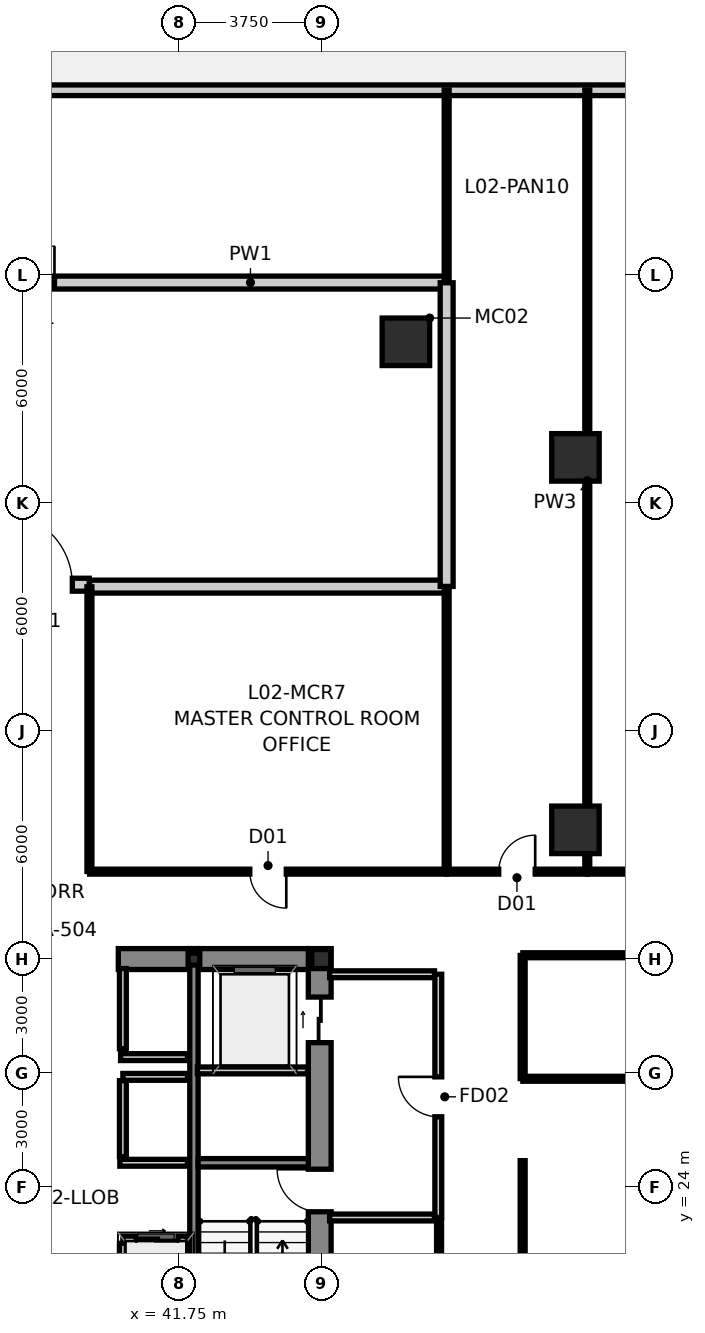
"""IFC4 building model, lengths in metres.
Left out: names, types, materials, properties, quantities, classifications, styles, units other than length and angle.
Written with IfcOpenShell. Run it as: python <this file> out.ifc"""

import sys

from ifc_helpers import new_model, si_unit, direction, frame, frame_2d, origin, origin_2d, place, context, subcontext, project, spatial, rectangle, hollow_rectangle, i_section, extrude, source, transform, mapped, element, fill, save


model = new_model("IFC4")
c1 = context("Model", 3, precision=1e-05, world=origin(), true_north=direction((0.0, 1.0)))
c2 = subcontext(c1, "Body", "Model", "MODEL_VIEW")
j1 = project(units=[si_unit("LENGTHUNIT", "METRE"), si_unit("PLANEANGLEUNIT", "RADIAN")], contexts=[c1])
p1 = place(None, origin())
s1 = spatial("IfcSite", under=j1, at=p1, CompositionType="ELEMENT")
p2 = place(p1, origin())
s2 = spatial("IfcBuilding", under=s1, at=p2, CompositionType="ELEMENT")
p3 = place(p2, frame((0.0, 0.0, 10.2)))
s3 = spatial("IfcBuildingStorey", under=s2, at=p3, CompositionType="ELEMENT", Elevation=10.2)
m1 = source(origin(), c2, "Body", "SweptSolid", [
    extrude(i_section(OverallWidth=0.5, OverallDepth=0.5, WebThickness=0.028, FlangeThickness=0.04, at=origin_2d()), origin(), (0.0, 0.0, 1.0), 4.5),
])
p4 = place(p3, frame((45.5, 30.0, 0.0), z_axis=(0.0, 0.0, 1.0), x_axis=(1.0, 0.0, 0.0)))
e1 = element("IfcColumn", 1, at=p4, inside=s3, PredefinedType="COLUMN", context=c2, shape_type="MappedRepresentation", body=[
    mapped(m1, transform((0.0, 0.0, 0.0), scale=1.0)),
])
m2 = source(origin(), c2, "Body", "SweptSolid", [
    extrude(i_section(OverallWidth=0.307, OverallDepth=0.315, WebThickness=0.012, FlangeThickness=0.019, at=origin_2d()), origin(), (0.0, 0.0, 1.0), 4.5),
])
p5 = place(p3, frame((42.15, 30.0, 0.0), z_axis=(0.0, 0.0, 1.0), x_axis=(1.0, 0.0, 0.0)))
e2 = element("IfcColumn", 2, at=p5, inside=s3, PredefinedType="COLUMN", context=c2, shape_type="MappedRepresentation", body=[
    mapped(m2, transform((0.0, 0.0, 0.0), scale=1.0)),
])
p6 = place(p3, frame((45.46, 16.85, 0.0), z_axis=(0.0, 0.0, 1.0), x_axis=(0.0, 1.0, 0.0)))
e3 = element("IfcWall", 3, at=p6, inside=s3, PredefinedType="SHEAR", context=c2, shape_type="SweptSolid", body=[
    extrude(rectangle(XDim=13.425, YDim=0.6, at=frame_2d((6.712, 0.0))), origin(), (0.0, 0.0, 1.0), 4.5),
])
p7 = place(p6, frame((6.5, 0.0, 0.0)))
e4 = element("IfcOpeningElement", 4, at=p7, cuts=e3, PredefinedType="OPENING", context=c2, shape_type="SweptSolid", body=[
    extrude(rectangle(XDim=1.12, YDim=2.15, at=frame_2d((0.56, 1.075))), frame((0.0, 0.312, 0.0), z_axis=(0.0, -1.0, 0.0), x_axis=(1.0, 0.0, 0.0)), (0.0, 0.0, 1.0), 0.624),
])
p8 = place(p6, frame((10.95, 0.0, 0.0)))
e5 = element("IfcOpeningElement", 5, at=p8, cuts=e3, PredefinedType="OPENING", context=c2, shape_type="SweptSolid", body=[
    extrude(rectangle(XDim=1.2, YDim=2.2, at=frame_2d((0.6, 1.1))), frame((0.0, 0.312, 0.0), z_axis=(0.0, -1.0, 0.0), x_axis=(1.0, 0.0, 0.0)), (0.0, 0.0, 1.0), 0.624),
])
p9 = place(p3, frame((40.16, 30.0, 0.0), z_axis=(0.0, 0.0, 1.0), x_axis=(1.0, 0.0, 0.0)))
e6 = element("IfcWall", 6, at=p9, inside=s3, PredefinedType="SHEAR", context=c2, shape_type="SweptSolid", body=[
    extrude(rectangle(XDim=1.88, YDim=0.55, at=frame_2d((0.94, 0.0))), origin(), (0.0, 0.0, 1.0), 4.5),
])
p10 = place(p3, frame((42.26, 30.0, 0.0), z_axis=(0.0, 0.0, 1.0), x_axis=(1.0, 0.0, 0.0)))
e7 = element("IfcWall", 7, at=p10, inside=s3, PredefinedType="SHEAR", context=c2, shape_type="SweptSolid", body=[
    extrude(rectangle(XDim=2.9, YDim=0.55, at=frame_2d((1.45, 0.0))), origin(), (0.0, 0.0, 1.0), 4.5),
])
p11 = place(p3, frame((42.15, 16.85, 0.0), z_axis=(0.0, 0.0, 1.0), x_axis=(0.0, 1.0, 0.0)))
e8 = element("IfcWall", 8, at=p11, inside=s3, PredefinedType="SHEAR", context=c2, shape_type="SweptSolid", body=[
    extrude(rectangle(XDim=13.425, YDim=0.22, at=frame_2d((6.712, 0.0))), origin(), (0.0, 0.0, 1.0), 4.5),
])
p12 = place(p3, frame((42.26, 24.64, 0.0), z_axis=(0.0, 0.0, 1.0), x_axis=(1.0, 0.0, 0.0)))
e9 = element("IfcWall", 9, at=p12, inside=s3, PredefinedType="SHEAR", context=c2, shape_type="SweptSolid", body=[
    extrude(rectangle(XDim=2.9, YDim=0.22, at=frame_2d((1.45, 0.0))), origin(), (0.0, 0.0, 1.0), 4.5),
])
m3 = source(origin(), c2, "Body", "SweptSolid", [
    extrude(hollow_rectangle(XDim=1.25, YDim=1.25, WallThickness=0.07, at=origin_2d()), origin(), (0.0, 0.0, 1.0), 4.501),
])
p13 = place(p3, frame((47.727, 46.241, 0.0), z_axis=(-0.023918900089, 0.001735611798, 0.999712395577), x_axis=(-0.072372078217, -0.997377702926, 0.0)))
e10 = element("IfcColumn", 10, at=p13, inside=s3, PredefinedType="COLUMN", context=c2, shape_type="MappedRepresentation", body=[
    mapped(m3, transform((0.0, 0.0, 0.0), scale=1.0)),
])
m4 = source(origin(), c2, "Body", "SweptSolid", [
    extrude(hollow_rectangle(XDim=1.25, YDim=1.25, WallThickness=0.07, at=origin_2d()), origin(), (0.0, 0.0, 1.0), 4.5),
])
for number, where, z_axis, x_axis in (
    (11, (52.189, 33.4, 0.0), (0.0, 0.0, 1.0), (1.0, 0.0, 0.0)),
    (12, (52.189, 43.2, 0.0), (0.0, 0.0, 1.0), (1.0, 0.0, 0.0)),
):
    element("IfcColumn", number, at=place(p3, frame(where, z_axis=z_axis, x_axis=x_axis)), inside=s3, PredefinedType="COLUMN", context=c2, shape_type="MappedRepresentation", body=[
        mapped(m4, transform((0.0, 0.0, 0.0), scale=1.0)),
    ])
p14 = place(p3, frame((6.861, 52.86, 0.0), z_axis=(0.0, 0.0, 1.0), x_axis=(1.0, 0.0, 0.0)))
e13 = element("IfcWall", 13, at=p14, inside=s3, PredefinedType="STANDARD", context=c2, shape_type="SweptSolid", body=[
    extrude(rectangle(XDim=64.278, YDim=0.28, at=frame_2d((32.139, 0.0))), origin(), (0.0, 0.0, 1.0), 4.18),
])
p15 = place(p3, frame((40.28, 22.62, 0.0), z_axis=(0.0, 0.0, 1.0), x_axis=(1.0, 0.0, 0.0)))
e14 = element("IfcWall", 14, at=p15, inside=s3, PredefinedType="PARTITIONING", context=c2, shape_type="SweptSolid", body=[
    extrude(rectangle(XDim=1.7, YDim=0.18, at=frame_2d((0.85, 0.0))), origin(), (0.0, 0.0, 1.0), 4.18),
])
p16 = place(p15, frame((0.35, 0.0, 0.0)))
e15 = element("IfcOpeningElement", 15, at=p16, cuts=e14, PredefinedType="OPENING", context=c2, shape_type="SweptSolid", body=[
    extrude(rectangle(XDim=1.1, YDim=2.2, at=frame_2d((0.55, 1.1))), frame((0.0, 0.102, 0.0), z_axis=(0.0, -1.0, 0.0), x_axis=(1.0, 0.0, 0.0)), (0.0, 0.0, 1.0), 0.204),
])
p17 = place(p3, frame((40.28, 20.52, 0.0), z_axis=(0.0, 0.0, 1.0), x_axis=(0.0, 1.0, 0.0)))
e16 = element("IfcWall", 16, at=p17, inside=s3, PredefinedType="PARTITIONING", context=c2, shape_type="SweptSolid", body=[
    extrude(rectangle(XDim=2.0, YDim=0.18, at=frame_2d((1.0, 0.0))), origin(), (0.0, 0.0, 1.0), 4.18),
])
p18 = place(p3, frame((40.28, 26.9, 0.0), z_axis=(0.0, 0.0, 1.0), x_axis=(1.0, 0.0, 0.0)))
e17 = element("IfcWall", 17, at=p18, inside=s3, PredefinedType="PARTITIONING", context=c2, shape_type="SweptSolid", body=[
    extrude(rectangle(XDim=1.7, YDim=0.18, at=frame_2d((0.85, 0.0))), origin(), (0.0, 0.0, 1.0), 4.18),
])
p19 = place(p3, frame((40.28, 24.8, 0.0), z_axis=(0.0, 0.0, 1.0), x_axis=(0.0, 1.0, 0.0)))
e18 = element("IfcWall", 18, at=p19, inside=s3, PredefinedType="PARTITIONING", context=c2, shape_type="SweptSolid", body=[
    extrude(rectangle(XDim=2.0, YDim=0.18, at=frame_2d((1.0, 0.0))), origin(), (0.0, 0.0, 1.0), 4.18),
])
p20 = place(p3, frame((40.2, 24.64, 0.0), z_axis=(0.0, 0.0, 1.0), x_axis=(1.0, 0.0, 0.0)))
e19 = element("IfcWall", 19, at=p20, inside=s3, PredefinedType="PARTITIONING", context=c2, shape_type="SweptSolid", body=[
    extrude(rectangle(XDim=1.78, YDim=0.18, at=frame_2d((0.89, 0.0))), origin(), (0.0, 0.0, 1.0), 4.18),
])
p21 = place(p3, frame((40.22, 27.42, 0.0), z_axis=(0.0, 0.0, 1.0), x_axis=(1.0, 0.0, 0.0)))
e20 = element("IfcWall", 20, at=p21, inside=s3, PredefinedType="PARTITIONING", context=c2, shape_type="SweptSolid", body=[
    extrude(rectangle(XDim=1.76, YDim=0.18, at=frame_2d((0.88, 0.0))), origin(), (0.0, 0.0, 1.0), 4.18),
])
p22 = place(p3, frame((40.28, 27.64, 0.0), z_axis=(0.0, 0.0, 1.0), x_axis=(0.0, 1.0, 0.0)))
e21 = element("IfcWall", 21, at=p22, inside=s3, PredefinedType="PARTITIONING", context=c2, shape_type="SweptSolid", body=[
    extrude(rectangle(XDim=2.11, YDim=0.18, at=frame_2d((1.055, 0.0))), origin(), (0.0, 0.0, 1.0), 4.18),
])
p23 = place(p3, frame((48.58, 23.2, 0.0), z_axis=(0.0, 0.0, 1.0), x_axis=(0.0, 1.0, 0.0)))
e22 = element("IfcWall", 22, at=p23, inside=s3, PredefinedType="PARTITIONING", context=c2, shape_type="SweptSolid", body=[
    extrude(rectangle(XDim=6.4, YDim=0.18, at=frame_2d((3.2, 0.0))), origin(), (0.0, 0.0, 1.0), 4.18),
])
p24 = place(p23, frame((2.65, 0.0, 0.0)))
e23 = element("IfcOpeningElement", 23, at=p24, cuts=e22, PredefinedType="OPENING", context=c2, shape_type="SweptSolid", body=[
    extrude(rectangle(XDim=1.05, YDim=2.15, at=frame_2d((0.525, 1.075))), frame((0.0, 0.102, 0.0), z_axis=(0.0, -1.0, 0.0), x_axis=(1.0, 0.0, 0.0)), (0.0, 0.0, 1.0), 0.204),
])
p25 = place(p3, frame((45.72, 23.2, 0.0), z_axis=(0.0, 0.0, 1.0), x_axis=(1.0, 0.0, 0.0)))
e24 = element("IfcWall", 24, at=p25, inside=s3, PredefinedType="PARTITIONING", context=c2, shape_type="SweptSolid", body=[
    extrude(rectangle(XDim=2.76, YDim=0.18, at=frame_2d((1.38, 0.0))), origin(), (0.0, 0.0, 1.0), 4.18),
])
p26 = place(p3, frame((45.72, 29.6, 0.0), z_axis=(0.0, 0.0, 1.0), x_axis=(1.0, 0.0, 0.0)))
e25 = element("IfcWall", 25, at=p26, inside=s3, PredefinedType="PARTITIONING", context=c2, shape_type="SweptSolid", body=[
    extrude(rectangle(XDim=2.76, YDim=0.18, at=frame_2d((1.38, 0.0))), origin(), (0.0, 0.0, 1.0), 3.553),
])
p27 = place(p3, frame((42.24, 27.07, 0.0), z_axis=(0.0, 0.0, 1.0), x_axis=(1.0, 0.0, 0.0)))
e26 = element("IfcWall", 26, at=p27, inside=s3, PredefinedType="PARTITIONING", context=c2, shape_type="SweptSolid", body=[
    extrude(rectangle(XDim=2.9, YDim=0.18, at=frame_2d((1.45, 0.0))), origin(), (0.0, 0.0, 1.0), 4.18),
])
p28 = place(p3, frame((27.205, 47.8, 0.0), z_axis=(0.0, 0.0, 1.0), x_axis=(1.0, 0.0, 0.0)))
e27 = element("IfcWall", 27, at=p28, inside=s3, PredefinedType="PARTITIONING", context=c2, shape_type="SweptSolid", body=[
    extrude(rectangle(XDim=21.59, YDim=0.34, at=frame_2d((10.795, 0.0))), origin(), (0.0, 0.0, 1.0), 4.18),
])
p29 = place(p28, frame((10.315, 0.0, 0.0)))
e28 = element("IfcOpeningElement", 28, at=p29, cuts=e27, PredefinedType="OPENING", context=c2, shape_type="SweptSolid", body=[
    extrude(rectangle(XDim=0.96, YDim=2.15, at=frame_2d((0.48, 1.075))), frame((0.0, 0.182, 0.0), z_axis=(0.0, -1.0, 0.0), x_axis=(1.0, 0.0, 0.0)), (0.0, 0.0, 1.0), 0.364),
])
p30 = place(p3, frame((39.405, 39.8, 0.0), z_axis=(0.0, 0.0, 1.0), x_axis=(1.0, 0.0, 0.0)))
e29 = element("IfcWall", 29, at=p30, inside=s3, PredefinedType="PARTITIONING", context=c2, shape_type="SweptSolid", body=[
    extrude(rectangle(XDim=9.39, YDim=0.34, at=frame_2d((4.695, 0.0))), origin(), (0.0, 0.0, 1.0), 4.18),
])
p31 = place(p3, frame((48.8, 39.805, 0.0), z_axis=(0.0, 0.0, 1.0), x_axis=(0.0, 1.0, 0.0)))
e30 = element("IfcWall", 30, at=p31, inside=s3, PredefinedType="PARTITIONING", context=c2, shape_type="SweptSolid", body=[
    extrude(rectangle(XDim=7.99, YDim=0.34, at=frame_2d((3.995, 0.0))), origin(), (0.0, 0.0, 1.0), 4.18),
])
p32 = place(p3, frame((36.605, 39.85, 0.0), z_axis=(0.0, 0.0, 1.0), x_axis=(1.0, 0.0, 0.0)))
e31 = element("IfcWall", 31, at=p32, inside=s3, PredefinedType="PARTITIONING", context=c2, shape_type="SweptSolid", body=[
    extrude(rectangle(XDim=2.79, YDim=0.34, at=frame_2d((1.395, 0.0))), origin(), (0.0, 0.0, 1.0), 4.18),
])
p33 = place(p32, frame((0.445, 0.0, 0.0)))
e32 = element("IfcOpeningElement", 32, at=p33, cuts=e31, PredefinedType="OPENING", context=c2, shape_type="SweptSolid", body=[
    extrude(rectangle(XDim=1.9, YDim=2.35, at=frame_2d((0.95, 1.175))), frame((0.0, 0.182, 0.0), z_axis=(0.0, -1.0, 0.0), x_axis=(1.0, 0.0, 0.0)), (0.0, 0.0, 1.0), 0.364),
])
p34 = place(p3, frame((52.5, 32.305, 0.0), z_axis=(0.0, 0.0, 1.0), x_axis=(0.0, 1.0, 0.0)))
e33 = element("IfcWall", 33, at=p34, inside=s3, PredefinedType="PARTITIONING", context=c2, shape_type="SweptSolid", body=[
    extrude(rectangle(XDim=20.565, YDim=0.13, at=frame_2d((10.283, 0.0))), origin(), (0.0, 0.0, 1.0), 3.165),
])
p35 = place(p3, frame((61.495, 30.1, 0.0), z_axis=(0.0, 0.0, 1.0), x_axis=(-1.0, 0.0, 0.0)))
e34 = element("IfcWall", 34, at=p35, inside=s3, PredefinedType="PARTITIONING", context=c2, shape_type="SweptSolid", body=[
    extrude(rectangle(XDim=10.69, YDim=0.13, at=frame_2d((5.345, 0.0))), origin(), (0.0, 0.0, 1.0), 3.553),
])
p36 = place(p35, frame((5.22, 0.0, 0.0)))
e35 = element("IfcOpeningElement", 35, at=p36, cuts=e34, PredefinedType="OPENING", context=c2, shape_type="SweptSolid", body=[
    extrude(rectangle(XDim=0.96, YDim=2.15, at=frame_2d((0.48, 1.075))), frame((0.0, 0.077, 0.0), z_axis=(0.0, -1.0, 0.0), x_axis=(1.0, 0.0, 0.0)), (0.0, 0.0, 1.0), 0.154),
])
p37 = place(p3, frame((48.795, 32.3, 0.0), z_axis=(0.0, 0.0, 1.0), x_axis=(-1.0, 0.0, 0.0)))
e36 = element("IfcWall", 36, at=p37, inside=s3, PredefinedType="PARTITIONING", context=c2, shape_type="SweptSolid", body=[
    extrude(rectangle(XDim=9.39, YDim=0.13, at=frame_2d((4.695, 0.0))), origin(), (0.0, 0.0, 1.0), 4.18),
])
p38 = place(p37, frame((4.215, 0.0, 0.0)))
e37 = element("IfcOpeningElement", 37, at=p38, cuts=e36, PredefinedType="OPENING", context=c2, shape_type="SweptSolid", body=[
    extrude(rectangle(XDim=0.96, YDim=2.15, at=frame_2d((0.48, 1.075))), frame((0.0, 0.077, 0.0), z_axis=(0.0, -1.0, 0.0), x_axis=(1.0, 0.0, 0.0)), (0.0, 0.0, 1.0), 0.154),
])
p39 = place(p3, frame((52.505, 32.3, 0.0), z_axis=(0.0, 0.0, 1.0), x_axis=(1.0, 0.0, 0.0)))
e38 = element("IfcWall", 38, at=p39, inside=s3, PredefinedType="PARTITIONING", context=c2, shape_type="SweptSolid", body=[
    extrude(rectangle(XDim=8.99, YDim=0.13, at=frame_2d((4.495, 0.0))), origin(), (0.0, 0.0, 1.0), 4.18),
])
p40 = place(p3, frame((48.6, 14.355, 0.0), z_axis=(0.0, 0.0, 1.0), x_axis=(0.0, 1.0, 0.0)))
e39 = element("IfcWall", 39, at=p40, inside=s3, PredefinedType="PARTITIONING", context=c2, shape_type="SweptSolid", body=[
    extrude(rectangle(XDim=8.75, YDim=0.13, at=frame_2d((4.375, 0.0))), origin(), (0.0, 0.0, 1.0), 4.18),
])
p41 = place(p3, frame((50.805, 26.85, 0.0), z_axis=(0.0, 0.0, 1.0), x_axis=(1.0, 0.0, 0.0)))
e40 = element("IfcWall", 40, at=p41, inside=s3, PredefinedType="PARTITIONING", context=c2, shape_type="SweptSolid", body=[
    extrude(rectangle(XDim=8.49, YDim=0.13, at=frame_2d((4.245, 0.0))), origin(), (0.0, 0.0, 1.0), 4.18),
])
for number, where, z_axis, x_axis in (
    (41, (39.4, 32.305, 0.0), (0.0, 0.0, 1.0), (0.0, 1.0, 0.0)),
    (42, (48.8, 32.305, 0.0), (0.0, 0.0, 1.0), (0.0, 1.0, 0.0)),
):
    element("IfcWall", number, at=place(p3, frame(where, z_axis=z_axis, x_axis=x_axis)), inside=s3, PredefinedType="PARTITIONING", context=c2, shape_type="SweptSolid", body=[
        extrude(rectangle(XDim=7.49, YDim=0.13, at=frame_2d((3.745, 0.0))), origin(), (0.0, 0.0, 1.0), 4.18),
    ])
p42 = place(p3, frame((50.8, 24.695, 0.0), z_axis=(0.0, 0.0, 1.0), x_axis=(0.0, -1.0, 0.0)))
e43 = element("IfcWall", 43, at=p42, inside=s3, PredefinedType="PARTITIONING", context=c2, shape_type="SweptSolid", body=[
    extrude(rectangle(XDim=5.19, YDim=0.13, at=frame_2d((2.595, 0.0))), origin(), (0.0, 0.0, 1.0), 4.18),
])
p43 = place(p3, frame((48.8, 47.805, 0.0), z_axis=(0.0, 0.0, 1.0), x_axis=(0.0, 1.0, 0.0)))
e44 = element("IfcWall", 44, at=p43, inside=s3, PredefinedType="PARTITIONING", context=c2, shape_type="SweptSolid", body=[
    extrude(rectangle(XDim=5.065, YDim=0.13, at=frame_2d((2.533, 0.0))), origin(), (0.0, 0.0, 1.0), 4.18),
])
p44 = place(p3, frame((48.805, 32.3, 0.0), z_axis=(0.0, 0.0, 1.0), x_axis=(1.0, 0.0, 0.0)))
e45 = element("IfcWall", 45, at=p44, inside=s3, PredefinedType="PARTITIONING", context=c2, shape_type="SweptSolid", body=[
    extrude(rectangle(XDim=3.69, YDim=0.13, at=frame_2d((1.845, 0.0))), origin(), (0.0, 0.0, 1.0), 4.18),
])
p45 = place(p44, frame((1.365, 0.0, 0.0)))
e46 = element("IfcOpeningElement", 46, at=p45, cuts=e45, PredefinedType="OPENING", context=c2, shape_type="SweptSolid", body=[
    extrude(rectangle(XDim=0.96, YDim=2.15, at=frame_2d((0.48, 1.075))), frame((0.0, 0.077, 0.0), z_axis=(0.0, -1.0, 0.0), x_axis=(1.0, 0.0, 0.0)), (0.0, 0.0, 1.0), 0.154),
])
p46 = place(p3, frame((50.8, 30.095, 0.0), z_axis=(0.0, 0.0, 1.0), x_axis=(0.0, -1.0, 0.0)))
e47 = element("IfcWall", 47, at=p46, inside=s3, PredefinedType="PARTITIONING", context=c2, shape_type="SweptSolid", body=[
    extrude(rectangle(XDim=3.24, YDim=0.13, at=frame_2d((1.62, 0.0))), origin(), (0.0, 0.0, 1.0), 4.18),
])
p47 = place(p7, origin())
e48 = element("IfcDoor", 48, at=p47, inside=s3, OperationType="SINGLE_SWING_RIGHT", PredefinedType="DOOR", context=c2, shape_type="SweptSolid", body=[
    extrude(rectangle(XDim=1.12, YDim=2.15, at=frame_2d((0.56, 1.075))), frame((0.0, 0.025, 0.0), z_axis=(0.0, -1.0, 0.0), x_axis=(1.0, 0.0, 0.0)), (0.0, 0.0, 1.0), 0.05),
])
fill(e4, e48)
p48 = place(p8, origin())
e49 = element("IfcDoor", 49, at=p48, inside=s3, OperationType="SLIDING_TO_RIGHT", PredefinedType="DOOR", context=c2, shape_type="SweptSolid", body=[
    extrude(rectangle(XDim=1.2, YDim=2.2, at=frame_2d((0.6, 1.1))), frame((0.0, 0.025, 0.0), z_axis=(0.0, -1.0, 0.0), x_axis=(1.0, 0.0, 0.0)), (0.0, 0.0, 1.0), 0.05),
])
fill(e5, e49)
p49 = place(p16, origin())
e50 = element("IfcDoor", 50, at=p49, inside=s3, OperationType="SLIDING_TO_LEFT", PredefinedType="DOOR", context=c2, shape_type="SweptSolid", body=[
    extrude(rectangle(XDim=1.1, YDim=2.2, at=frame_2d((0.55, 1.1))), frame((0.0, 0.025, 0.0), z_axis=(0.0, -1.0, 0.0), x_axis=(1.0, 0.0, 0.0)), (0.0, 0.0, 1.0), 0.05),
])
fill(e15, e50)
p50 = place(p24, origin())
e51 = element("IfcDoor", 51, at=p50, inside=s3, OperationType="SINGLE_SWING_RIGHT", PredefinedType="DOOR", context=c2, shape_type="SweptSolid", body=[
    extrude(rectangle(XDim=1.05, YDim=2.15, at=frame_2d((0.525, 1.075))), frame((0.0, 0.025, 0.0), z_axis=(0.0, -1.0, 0.0), x_axis=(1.0, 0.0, 0.0)), (0.0, 0.0, 1.0), 0.05),
])
fill(e23, e51)
p51 = place(p29, origin())
e52 = element("IfcDoor", 52, at=p51, inside=s3, OperationType="SINGLE_SWING_RIGHT", PredefinedType="DOOR", context=c2, shape_type="SweptSolid", body=[
    extrude(rectangle(XDim=0.96, YDim=2.15, at=frame_2d((0.48, 1.075))), frame((0.0, 0.025, 0.0), z_axis=(0.0, -1.0, 0.0), x_axis=(1.0, 0.0, 0.0)), (0.0, 0.0, 1.0), 0.05),
])
fill(e28, e52)
p52 = place(p33, origin())
e53 = element("IfcDoor", 53, at=p52, inside=s3, OperationType="DOUBLE_DOOR_SINGLE_SWING", PredefinedType="DOOR", context=c2, shape_type="SweptSolid", body=[
    extrude(rectangle(XDim=1.9, YDim=2.35, at=frame_2d((0.95, 1.175))), frame((0.0, 0.025, 0.0), z_axis=(0.0, -1.0, 0.0), x_axis=(1.0, 0.0, 0.0)), (0.0, 0.0, 1.0), 0.05),
])
fill(e32, e53)
p53 = place(p38, origin())
e54 = element("IfcDoor", 54, at=p53, inside=s3, OperationType="SINGLE_SWING_LEFT", PredefinedType="DOOR", context=c2, shape_type="SweptSolid", body=[
    extrude(rectangle(XDim=0.96, YDim=2.15, at=frame_2d((0.48, 1.075))), frame((0.0, 0.025, 0.0), z_axis=(0.0, -1.0, 0.0), x_axis=(1.0, 0.0, 0.0)), (0.0, 0.0, 1.0), 0.05),
])
fill(e37, e54)
p54 = place(p45, origin())
e55 = element("IfcDoor", 55, at=p54, inside=s3, OperationType="SINGLE_SWING_RIGHT", PredefinedType="DOOR", context=c2, shape_type="SweptSolid", body=[
    extrude(rectangle(XDim=0.96, YDim=2.15, at=frame_2d((0.48, 1.075))), frame((0.0, 0.025, 0.0), z_axis=(0.0, -1.0, 0.0), x_axis=(1.0, 0.0, 0.0)), (0.0, 0.0, 1.0), 0.05),
])
fill(e46, e55)
save(model, sys.argv[1])
